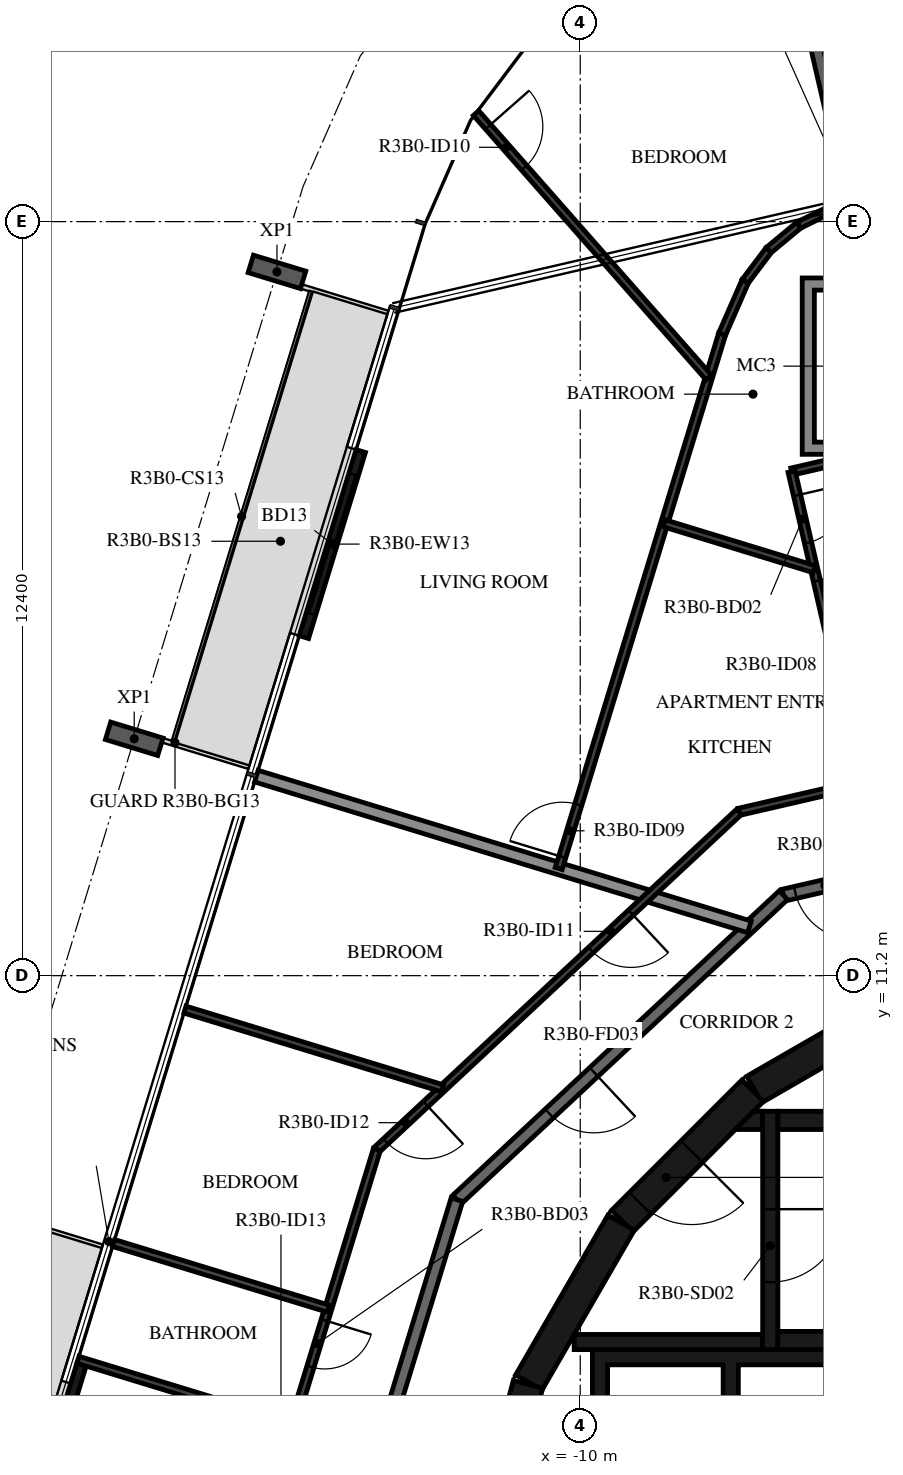
"""IFC4 building model, lengths in metres.
Left out: names, types, materials, properties, quantities, classifications, styles, units other than length and angle.
Written with IfcOpenShell. Run it as: python <this file> out.ifc"""

import sys

from ifc_helpers import new_model, si_unit, direction, frame, frame_2d, origin, origin_2d, place, context, subcontext, project, spatial, polyline, rectangle, i_section, outline, extrude, element, fill, save


model = new_model("IFC4")
c1 = context("Model", 3, precision=1e-05, world=origin(), true_north=direction((0.0, 1.0)))
c2 = subcontext(c1, "Body", "Model", "MODEL_VIEW")
j1 = project(units=[si_unit("LENGTHUNIT", "METRE"), si_unit("PLANEANGLEUNIT", "RADIAN")], contexts=[c1])
p1 = place(None, origin())
s1 = spatial("IfcSite", under=j1, at=p1, CompositionType="ELEMENT")
p2 = place(p1, origin())
s2 = spatial("IfcBuilding", under=s1, at=p2, CompositionType="ELEMENT")
p3 = place(p2, frame((0.0, 0.0, 127.4)))
s3 = spatial("IfcBuildingStorey", under=s2, at=p3, CompositionType="ELEMENT", Elevation=127.4)
for number, where, z_axis, x_axis in (
    (1, (-14.987, 22.773, -0.38), (0.0, 0.0, 1.0), (0.292, 0.956, 0.0)),
    (2, (-17.335, 15.095, -0.38), (0.0, 0.0, 1.0), (0.292, 0.956, 0.0)),
):
    element("IfcColumn", number, at=place(p3, frame(where, z_axis=z_axis, x_axis=x_axis)), inside=s3, PredefinedType="COLUMN", context=c2, shape_type="SweptSolid", body=[
        extrude(i_section(OverallWidth=0.3, OverallDepth=0.9, WebThickness=0.019, FlangeThickness=0.035, FilletRadius=0.03, at=origin_2d()), origin(), (0.0, 0.0, 1.0), 3.5),
    ])
p4 = place(p3, frame((-13.609, 19.827, 0.0), z_axis=(0.0, 0.0, 1.0), x_axis=(-0.292348395078, -0.956311882126, 0.0)))
e3 = element("IfcWall", 3, at=p4, inside=s3, PredefinedType="STANDARD", context=c2, shape_type="SweptSolid", body=[
    extrude(rectangle(XDim=3.2, YDim=0.16, at=frame_2d((1.6, 0.0))), origin(), (0.0, 0.0, 1.0), 3.12),
])
p5 = place(p4, frame((0.4, 0.0, 0.0)))
e4 = element("IfcOpeningElement", 4, at=p5, cuts=e3, PredefinedType="OPENING", context=c2, shape_type="SweptSolid", body=[
    extrude(rectangle(XDim=2.4, YDim=2.4, at=frame_2d((1.2, 1.2))), frame((0.0, 0.09, 0.0), z_axis=(0.0, -1.0, 0.0), x_axis=(1.0, 0.0, 0.0)), (0.0, 0.0, 1.0), 0.18),
])
p6 = place(p3, frame((-18.201, 4.807, 0.0), z_axis=(0.0, 0.0, 1.0), x_axis=(-0.292356467713, -0.956309414252, 0.0)))
e5 = element("IfcWall", 5, at=p6, inside=s3, PredefinedType="STANDARD", context=c2, shape_type="SweptSolid", body=[
    extrude(rectangle(XDim=3.552, YDim=0.16, at=frame_2d((1.776, 0.0))), origin(), (0.0, 0.0, 1.0), 3.12),
])
p7 = place(p6, frame((0.752, 0.0, 0.0)))
e6 = element("IfcOpeningElement", 6, at=p7, cuts=e5, PredefinedType="OPENING", context=c2, shape_type="SweptSolid", body=[
    extrude(rectangle(XDim=2.4, YDim=2.4, at=frame_2d((1.2, 1.2))), frame((0.0, 0.09, 0.0), z_axis=(0.0, -1.0, 0.0), x_axis=(1.0, 0.0, 0.0)), (0.0, 0.0, 1.0), 0.18),
])
p8 = place(p3, frame((-4.51, 10.845, 0.0), z_axis=(0.0, 0.0, 1.0), x_axis=(-0.865975092491, -0.500087131594, 0.0)))
e7 = element("IfcWall", 7, at=p8, inside=s3, PredefinedType="SHEAR", context=c2, shape_type="SweptSolid", body=[
    extrude(rectangle(XDim=3.033, YDim=0.5, at=frame_2d((1.516, 0.0))), origin(), (0.0, 0.0, 1.0), 3.12),
])
p9 = place(p3, frame((-7.164, 9.308, 0.0), z_axis=(0.0, 0.0, 1.0), x_axis=(-0.707106781187, -0.707106781187, 0.0)))
e8 = element("IfcWall", 8, at=p9, inside=s3, PredefinedType="SHEAR", context=c2, shape_type="SweptSolid", body=[
    extrude(rectangle(XDim=3.032, YDim=0.5, at=frame_2d((1.516, 0.0))), origin(), (0.0, 0.0, 1.0), 3.12),
])
p10 = place(p9, frame((1.416, 0.0, 0.0)))
e9 = element("IfcOpeningElement", 9, at=p10, cuts=e8, PredefinedType="OPENING", context=c2, shape_type="SweptSolid", body=[
    extrude(rectangle(XDim=1.2, YDim=2.1, at=frame_2d((0.6, 1.05))), frame((0.0, 0.26, 0.0), z_axis=(0.0, -1.0, 0.0), x_axis=(1.0, 0.0, 0.0)), (0.0, 0.0, 1.0), 0.52),
])
for number, where, z_axis, x_axis in (
    (10, (-9.329, 7.137, 0.0), (0.0, 0.0, 1.0), (-0.5, -0.866, 0.0)),
    (11, (-10.858, 4.479, 0.0), (0.0, 0.0, 1.0), (-0.259, -0.966, 0.0)),
):
    element("IfcWall", number, at=place(p3, frame(where, z_axis=z_axis, x_axis=x_axis)), inside=s3, PredefinedType="SHEAR", context=c2, shape_type="SweptSolid", body=[
        extrude(rectangle(XDim=3.033, YDim=0.5, at=frame_2d((1.516, 0.0))), origin(), (0.0, 0.0, 1.0), 3.12),
    ])
for number, where, z_axis, x_axis in (
    (12, (-6.75, 5.2, 0.0), (0.0, 0.0, 1.0), (1.0, 0.0, 0.0)),
    (13, (-6.75, 8.82, 0.0), (0.0, 0.0, 1.0), (1.0, 0.0, 0.0)),
):
    element("IfcWall", number, at=place(p3, frame(where, z_axis=z_axis, x_axis=x_axis)), inside=s3, PredefinedType="SHEAR", context=c2, shape_type="SweptSolid", body=[
        extrude(rectangle(XDim=6.75, YDim=0.3, at=frame_2d((3.375, 0.0))), origin(), (0.0, 0.0, 1.0), 3.12),
    ])
p11 = place(p3, frame((-6.875, 8.97, 0.0), z_axis=(0.0, 0.0, 1.0), x_axis=(0.0, -1.0, 0.0)))
e14 = element("IfcWall", 14, at=p11, inside=s3, PredefinedType="SHEAR", context=c2, shape_type="SweptSolid", body=[
    extrude(rectangle(XDim=3.92, YDim=0.25, at=frame_2d((1.96, 0.0))), origin(), (0.0, 0.0, 1.0), 3.12),
])
p12 = place(p11, frame((1.61, 0.0, 0.0)))
e15 = element("IfcOpeningElement", 15, at=p12, cuts=e14, PredefinedType="OPENING", context=c2, shape_type="SweptSolid", body=[
    extrude(rectangle(XDim=1.2, YDim=2.1, at=frame_2d((0.6, 1.05))), frame((0.0, 0.135, 0.0), z_axis=(0.0, -1.0, 0.0), x_axis=(1.0, 0.0, 0.0)), (0.0, 0.0, 1.0), 0.27),
])
p13 = place(p3, frame((-7.0, 5.175, 0.0), z_axis=(0.0, 0.0, 1.0), x_axis=(-1.0, 0.0, 0.0)))
e16 = element("IfcWall", 16, at=p13, inside=s3, PredefinedType="SHEAR", context=c2, shape_type="SweptSolid", body=[
    extrude(rectangle(XDim=3.1, YDim=0.25, at=frame_2d((1.55, 0.0))), origin(), (0.0, 0.0, 1.0), 3.12),
])
p14 = place(p3, origin())
e17 = element("IfcWall", 17, at=p14, inside=s3, PredefinedType="SHEAR", context=c2, shape_type="SweptSolid", body=[
    extrude(outline(polyline([(-7.148, 8.97), (-7.0, 8.97), (-7.0, 8.67), (-7.448, 8.67), (-7.148, 8.97)])), origin(), (0.0, 0.0, 1.0), 3.12),
])
p15 = place(p3, origin())
e18 = element("IfcWall", 18, at=p15, inside=s3, PredefinedType="SHEAR", context=c2, shape_type="SweptSolid", body=[
    extrude(outline(polyline([(-9.55, 4.8), (-7.65, 4.8), (-7.65, 1.9), (-7.4, 1.9), (-7.4, 4.8), (-5.5, 4.8), (-5.5, 1.9), (-5.25, 1.9), (-5.25, 4.8), (-3.35, 4.8), (-3.35, 1.9), (-3.1, 1.9), (-3.1, 4.8), (-1.2, 4.8), (-1.2, 1.9), (-0.95, 1.9), (-0.95, 4.8), (3.1, 4.8), (3.1, 1.9), (3.35, 1.9), (3.35, 4.8), (5.25, 4.8), (5.25, 1.9), (5.5, 1.9), (5.5, 4.8), (7.4, 4.8), (7.4, 1.9), (7.65, 1.9), (7.65, 4.8), (9.55, 4.8), (9.55, 1.9), (9.8, 1.9), (9.8, 4.8), (9.8, 5.05), (-9.8, 5.05), (-9.8, 4.8), (-9.8, 1.9), (-9.55, 1.9), (-9.55, 4.8)])), origin(), (0.0, 0.0, 1.0), 3.12),
])
p16 = place(p3, frame((0.495, 14.175, 0.0), z_axis=(0.0, 0.0, 1.0), x_axis=(-0.974376622151, -0.224922649383, 0.0)))
e19 = element("IfcWall", 19, at=p16, inside=s3, PredefinedType="STANDARD", context=c2, shape_type="SweptSolid", body=[
    extrude(rectangle(XDim=7.342, YDim=0.2, at=frame_2d((3.671, 0.0))), origin(), (0.0, 0.0, 1.0), 3.12),
])
p17 = place(p16, frame((6.142, 0.0, 0.0)))
e20 = element("IfcOpeningElement", 20, at=p17, cuts=e19, PredefinedType="OPENING", context=c2, shape_type="SweptSolid", body=[
    extrude(rectangle(XDim=1.0, YDim=2.1, at=frame_2d((0.5, 1.05))), frame((0.0, 0.11, 0.0), z_axis=(0.0, -1.0, 0.0), x_axis=(1.0, 0.0, 0.0)), (0.0, 0.0, 1.0), 0.22),
])
p18 = place(p3, frame((-6.659, 12.523, 0.0), z_axis=(0.0, 0.0, 1.0), x_axis=(-0.731350455479, -0.682001841105, 0.0)))
e21 = element("IfcWall", 21, at=p18, inside=s3, PredefinedType="STANDARD", context=c2, shape_type="SweptSolid", body=[
    extrude(rectangle(XDim=7.342, YDim=0.2, at=frame_2d((3.671, 0.0))), origin(), (0.0, 0.0, 1.0), 3.12),
])
p19 = place(p18, frame((4.264, 0.0, 0.0)))
e22 = element("IfcOpeningElement", 22, at=p19, cuts=e21, PredefinedType="OPENING", context=c2, shape_type="SweptSolid", body=[
    extrude(rectangle(XDim=1.0, YDim=2.1, at=frame_2d((0.5, 1.05))), frame((0.0, 0.11, 0.0), z_axis=(0.0, -1.0, 0.0), x_axis=(1.0, 0.0, 0.0)), (0.0, 0.0, 1.0), 0.22),
])
p20 = place(p3, frame((-12.028, 7.516, 0.0), z_axis=(0.0, 0.0, 1.0), x_axis=(-0.292365533182, -0.956306642771, 0.0)))
e23 = element("IfcWall", 23, at=p20, inside=s3, PredefinedType="STANDARD", context=c2, shape_type="SweptSolid", body=[
    extrude(rectangle(XDim=7.342, YDim=0.2, at=frame_2d((3.671, 0.0))), origin(), (0.0, 0.0, 1.0), 3.12),
])
p21 = place(p3, frame((-6.687, 28.966, 0.0), z_axis=(0.0, 0.0, 1.0), x_axis=(0.224945100086, -0.974371439415, 0.0)))
e24 = element("IfcWall", 24, at=p21, inside=s3, PredefinedType="STANDARD", context=c2, shape_type="SweptSolid", body=[
    extrude(rectangle(XDim=6.458, YDim=0.2, at=frame_2d((3.229, 0.0))), origin(), (0.0, 0.0, 1.0), 3.12),
])
p22 = place(p3, frame((-15.327, 14.481, 0.0), z_axis=(0.0, 0.0, 1.0), x_axis=(0.956303504869, -0.292375796837, 0.0)))
e25 = element("IfcWall", 25, at=p22, inside=s3, PredefinedType="STANDARD", context=c2, shape_type="SweptSolid", body=[
    extrude(rectangle(XDim=8.48, YDim=0.2, at=frame_2d((4.24, 0.0))), origin(), (0.0, 0.0, 1.0), 2.73),
])
p23 = place(p3, frame((-5.293, 19.773, 0.0), z_axis=(0.0, 0.0, 1.0), x_axis=(-0.974391195695, -0.224859506699, 0.0)))
e26 = element("IfcWall", 26, at=p23, inside=s3, PredefinedType="PARTITIONING", context=c2, shape_type="SweptSolid", body=[
    extrude(rectangle(XDim=1.264, YDim=0.12, at=frame_2d((0.632, 0.0))), origin(), (0.0, 0.0, 1.0), 3.12),
])
p24 = place(p3, frame((-6.524, 19.489, 0.0), z_axis=(0.0, 0.0, 1.0), x_axis=(0.22494768659, -0.974370842286, 0.0)))
e27 = element("IfcWall", 27, at=p24, inside=s3, PredefinedType="PARTITIONING", context=c2, shape_type="SweptSolid", body=[
    extrude(rectangle(XDim=5.257, YDim=0.12, at=frame_2d((2.629, 0.0))), origin(), (0.0, 0.0, 1.0), 3.12),
])
p25 = place(p24, frame((0.4, 0.0, 0.0)))
e28 = element("IfcOpeningElement", 28, at=p25, cuts=e27, PredefinedType="OPENING", context=c2, shape_type="SweptSolid", body=[
    extrude(rectangle(XDim=0.8, YDim=2.1, at=frame_2d((0.4, 1.05))), frame((0.0, 0.07, 0.0), z_axis=(0.0, -1.0, 0.0), x_axis=(1.0, 0.0, 0.0)), (0.0, 0.0, 1.0), 0.14),
])
p26 = place(p24, frame((1.846, 0.0, 0.0)))
e29 = element("IfcOpeningElement", 29, at=p26, cuts=e27, PredefinedType="OPENING", context=c2, shape_type="SweptSolid", body=[
    extrude(rectangle(XDim=0.9, YDim=2.1, at=frame_2d((0.45, 1.05))), frame((0.0, 0.07, 0.0), z_axis=(0.0, -1.0, 0.0), x_axis=(1.0, 0.0, 0.0)), (0.0, 0.0, 1.0), 0.14),
])
p27 = place(p3, frame((-5.342, 14.367, 0.0), z_axis=(0.0, 0.0, 1.0), x_axis=(-0.974367677287, -0.224961395484, 0.0)))
e30 = element("IfcWall", 30, at=p27, inside=s3, PredefinedType="PARTITIONING", context=c2, shape_type="SweptSolid", body=[
    extrude(rectangle(XDim=2.1, YDim=0.12, at=frame_2d((1.05, 0.0))), origin(), (0.0, 0.0, 1.0), 3.12),
])
p28 = place(p3, frame((-7.388, 13.894, 0.0), z_axis=(0.0, 0.0, 1.0), x_axis=(-0.731357186721, -0.681994622729, 0.0)))
e31 = element("IfcWall", 31, at=p28, inside=s3, PredefinedType="PARTITIONING", context=c2, shape_type="SweptSolid", body=[
    extrude(rectangle(XDim=8.146, YDim=0.12, at=frame_2d((4.073, 0.0))), origin(), (0.0, 0.0, 1.0), 3.12),
])
p29 = place(p28, frame((2.432, 0.0, 0.0)))
e32 = element("IfcOpeningElement", 32, at=p29, cuts=e31, PredefinedType="OPENING", context=c2, shape_type="SweptSolid", body=[
    extrude(rectangle(XDim=0.9, YDim=2.1, at=frame_2d((0.45, 1.05))), frame((0.0, 0.07, 0.0), z_axis=(0.0, -1.0, 0.0), x_axis=(1.0, 0.0, 0.0)), (0.0, 0.0, 1.0), 0.14),
])
p30 = place(p28, frame((7.046, 0.0, 0.0)))
e33 = element("IfcOpeningElement", 33, at=p30, cuts=e31, PredefinedType="OPENING", context=c2, shape_type="SweptSolid", body=[
    extrude(rectangle(XDim=0.9, YDim=2.1, at=frame_2d((0.45, 1.05))), frame((0.0, 0.07, 0.0), z_axis=(0.0, -1.0, 0.0), x_axis=(1.0, 0.0, 0.0)), (0.0, 0.0, 1.0), 0.14),
])
p31 = place(p3, frame((-10.354, 12.961, 0.0), z_axis=(0.0, 0.0, 1.0), x_axis=(0.292379778045, 0.956302287663, 0.0)))
e34 = element("IfcWall", 34, at=p31, inside=s3, PredefinedType="PARTITIONING", context=c2, shape_type="SweptSolid", body=[
    extrude(rectangle(XDim=9.194, YDim=0.12, at=frame_2d((4.597, 0.0))), origin(), (0.0, 0.0, 1.0), 3.12),
])
p32 = place(p31, frame((0.2, 0.0, 0.0)))
e35 = element("IfcOpeningElement", 35, at=p32, cuts=e34, PredefinedType="OPENING", context=c2, shape_type="SweptSolid", body=[
    extrude(rectangle(XDim=0.9, YDim=2.1, at=frame_2d((0.45, 1.05))), frame((0.0, 0.07, 0.0), z_axis=(0.0, -1.0, 0.0), x_axis=(1.0, 0.0, 0.0)), (0.0, 0.0, 1.0), 0.14),
])
p33 = place(p3, frame((-7.666, 21.753, 0.0), z_axis=(0.0, 0.0, 1.0), x_axis=(0.401562829944, 0.915831476642, 0.0)))
e36 = element("IfcWall", 36, at=p33, inside=s3, PredefinedType="PARTITIONING", context=c2, shape_type="SweptSolid", body=[
    extrude(rectangle(XDim=0.947, YDim=0.12, at=frame_2d((0.473, 0.0))), origin(), (0.0, 0.0, 1.0), 3.12),
])
p34 = place(p3, frame((-7.286, 22.62, 0.0), z_axis=(0.0, 0.0, 1.0), x_axis=(0.601702575527, 0.798720233, 0.0)))
e37 = element("IfcWall", 37, at=p34, inside=s3, PredefinedType="PARTITIONING", context=c2, shape_type="SweptSolid", body=[
    extrude(rectangle(XDim=0.642, YDim=0.12, at=frame_2d((0.321, 0.0))), origin(), (0.0, 0.0, 1.0), 3.12),
])
p35 = place(p3, frame((-6.9, 23.132, 0.0), z_axis=(0.0, 0.0, 1.0), x_axis=(0.769653132962, 0.638462258025, 0.0)))
e38 = element("IfcWall", 38, at=p35, inside=s3, PredefinedType="PARTITIONING", context=c2, shape_type="SweptSolid", body=[
    extrude(rectangle(XDim=0.642, YDim=0.12, at=frame_2d((0.321, 0.0))), origin(), (0.0, 0.0, 1.0), 3.12),
])
p36 = place(p3, frame((-6.406, 23.542, 0.0), z_axis=(0.0, 0.0, 1.0), x_axis=(0.896245703043, 0.44355793283, 0.0)))
e39 = element("IfcWall", 39, at=p36, inside=s3, PredefinedType="PARTITIONING", context=c2, shape_type="SweptSolid", body=[
    extrude(rectangle(XDim=0.642, YDim=0.12, at=frame_2d((0.321, 0.0))), origin(), (0.0, 0.0, 1.0), 3.12),
])
p37 = place(p3, frame((-11.713, 25.385, 0.0), z_axis=(0.0, 0.0, 1.0), x_axis=(0.660694383024, -0.750655002142, 0.0)))
e40 = element("IfcWall", 40, at=p37, inside=s3, PredefinedType="PARTITIONING", context=c2, shape_type="SweptSolid", body=[
    extrude(rectangle(XDim=5.794, YDim=0.12, at=frame_2d((2.897, 0.0))), origin(), (0.0, 0.0, 1.0), 3.12),
])
p38 = place(p37, frame((0.3, 0.0, 0.0)))
e41 = element("IfcOpeningElement", 41, at=p38, cuts=e40, PredefinedType="OPENING", context=c2, shape_type="SweptSolid", body=[
    extrude(rectangle(XDim=0.9, YDim=2.1, at=frame_2d((0.45, 1.05))), frame((0.0, 0.07, 0.0), z_axis=(0.0, -1.0, 0.0), x_axis=(1.0, 0.0, 0.0)), (0.0, 0.0, 1.0), 0.14),
])
p39 = place(p3, frame((-8.618, 18.639, 0.0), z_axis=(0.0, 0.0, 1.0), x_axis=(0.956305961168, -0.292367762647, 0.0)))
e42 = element("IfcWall", 42, at=p39, inside=s3, PredefinedType="PARTITIONING", context=c2, shape_type="SweptSolid", body=[
    extrude(rectangle(XDim=2.577, YDim=0.12, at=frame_2d((1.289, 0.0))), origin(), (0.0, 0.0, 1.0), 3.12),
])
p40 = place(p3, frame((-13.345, 8.339, 0.0), z_axis=(0.0, 0.0, 1.0), x_axis=(-0.292341490839, -0.956313992752, 0.0)))
e43 = element("IfcWall", 43, at=p40, inside=s3, PredefinedType="PARTITIONING", context=c2, shape_type="SweptSolid", body=[
    extrude(rectangle(XDim=4.742, YDim=0.12, at=frame_2d((2.371, 0.0))), origin(), (0.0, 0.0, 1.0), 3.12),
])
p41 = place(p40, frame((2.935, 0.0, 0.0)))
e44 = element("IfcOpeningElement", 44, at=p41, cuts=e43, PredefinedType="OPENING", context=c2, shape_type="SweptSolid", body=[
    extrude(rectangle(XDim=0.8, YDim=2.1, at=frame_2d((0.4, 1.05))), frame((0.0, 0.07, 0.0), z_axis=(0.0, -1.0, 0.0), x_axis=(1.0, 0.0, 0.0)), (0.0, 0.0, 1.0), 0.14),
])
p42 = place(p3, frame((-16.5, 10.642, 0.0), z_axis=(0.0, 0.0, 1.0), x_axis=(0.9563053536, -0.292369749934, 0.0)))
e45 = element("IfcWall", 45, at=p42, inside=s3, PredefinedType="PARTITIONING", context=c2, shape_type="SweptSolid", body=[
    extrude(rectangle(XDim=4.43, YDim=0.12, at=frame_2d((2.215, 0.0))), origin(), (0.0, 0.0, 1.0), 3.12),
])
p43 = place(p3, frame((-17.674, 6.803, 0.0), z_axis=(0.0, 0.0, 1.0), x_axis=(0.956309456779, -0.292356328604, 0.0)))
e46 = element("IfcWall", 46, at=p43, inside=s3, PredefinedType="PARTITIONING", context=c2, shape_type="SweptSolid", body=[
    extrude(rectangle(XDim=3.691, YDim=0.12, at=frame_2d((1.846, 0.0))), origin(), (0.0, 0.0, 1.0), 2.73),
])
p44 = place(p3, frame((-14.731, 3.804, 0.0), z_axis=(0.0, 0.0, 1.0), x_axis=(-0.956303802771, 0.292374822456, 0.0)))
e47 = element("IfcWall", 47, at=p44, inside=s3, PredefinedType="PARTITIONING", context=c2, shape_type="SweptSolid", body=[
    extrude(rectangle(XDim=3.691, YDim=0.12, at=frame_2d((1.845, 0.0))), origin(), (0.0, 0.0, 1.0), 3.12),
])
p45 = place(p3, origin())
e48 = element("IfcWall", 48, at=p45, inside=s3, PredefinedType="STANDARD", context=c2, shape_type="SweptSolid", body=[
    extrude(outline(polyline([(-3.45, 22.674), (-3.45, 19.773), (-6.35, 19.773), (-6.35, 22.674), (-3.45, 22.674)]), holes=[polyline([(-6.15, 19.973), (-3.65, 19.973), (-3.65, 22.473), (-6.15, 22.473), (-6.15, 19.973)])]), origin(), (0.0, 0.0, 1.0), 3.12),
])
p46 = place(p5, origin())
e49 = element("IfcDoor", 49, at=p46, inside=s3, OperationType="DOUBLE_DOOR_SLIDING", PredefinedType="DOOR", context=c2, shape_type="SweptSolid", body=[
    extrude(rectangle(XDim=2.4, YDim=2.4, at=frame_2d((1.2, 1.2))), frame((0.0, 0.025, 0.0), z_axis=(0.0, -1.0, 0.0), x_axis=(1.0, 0.0, 0.0)), (0.0, 0.0, 1.0), 0.05),
])
fill(e4, e49)
p47 = place(p12, origin())
e50 = element("IfcDoor", 50, at=p47, inside=s3, OperationType="SINGLE_SWING_LEFT", PredefinedType="DOOR", context=c2, shape_type="SweptSolid", body=[
    extrude(rectangle(XDim=1.2, YDim=2.1, at=frame_2d((0.6, 1.05))), frame((0.0, 0.025, 0.0), z_axis=(0.0, -1.0, 0.0), x_axis=(1.0, 0.0, 0.0)), (0.0, 0.0, 1.0), 0.05),
])
fill(e15, e50)
p48 = place(p10, origin())
e51 = element("IfcDoor", 51, at=p48, inside=s3, OperationType="SINGLE_SWING_RIGHT", PredefinedType="DOOR", context=c2, shape_type="SweptSolid", body=[
    extrude(rectangle(XDim=1.2, YDim=2.1, at=frame_2d((0.6, 1.05))), frame((0.0, 0.025, 0.0), z_axis=(0.0, -1.0, 0.0), x_axis=(1.0, 0.0, 0.0)), (0.0, 0.0, 1.0), 0.05),
])
fill(e9, e51)
p49 = place(p17, origin())
e52 = element("IfcDoor", 52, at=p49, inside=s3, OperationType="SINGLE_SWING_LEFT", PredefinedType="DOOR", context=c2, shape_type="SweptSolid", body=[
    extrude(rectangle(XDim=1.0, YDim=2.1, at=frame_2d((0.5, 1.05))), frame((0.0, 0.025, 0.0), z_axis=(0.0, -1.0, 0.0), x_axis=(1.0, 0.0, 0.0)), (0.0, 0.0, 1.0), 0.05),
])
fill(e20, e52)
p50 = place(p25, origin())
e53 = element("IfcDoor", 53, at=p50, inside=s3, OperationType="SINGLE_SWING_LEFT", PredefinedType="DOOR", context=c2, shape_type="SweptSolid", body=[
    extrude(rectangle(XDim=0.8, YDim=2.1, at=frame_2d((0.4, 1.05))), frame((0.0, 0.025, 0.0), z_axis=(0.0, -1.0, 0.0), x_axis=(1.0, 0.0, 0.0)), (0.0, 0.0, 1.0), 0.05),
])
fill(e28, e53)
p51 = place(p26, origin())
e54 = element("IfcDoor", 54, at=p51, inside=s3, OperationType="SINGLE_SWING_LEFT", PredefinedType="DOOR", context=c2, shape_type="SweptSolid", body=[
    extrude(rectangle(XDim=0.9, YDim=2.1, at=frame_2d((0.45, 1.05))), frame((0.0, 0.025, 0.0), z_axis=(0.0, -1.0, 0.0), x_axis=(1.0, 0.0, 0.0)), (0.0, 0.0, 1.0), 0.05),
])
fill(e29, e54)
p52 = place(p32, origin())
e55 = element("IfcDoor", 55, at=p52, inside=s3, OperationType="SINGLE_SWING_LEFT", PredefinedType="DOOR", context=c2, shape_type="SweptSolid", body=[
    extrude(rectangle(XDim=0.9, YDim=2.1, at=frame_2d((0.45, 1.05))), frame((0.0, 0.025, 0.0), z_axis=(0.0, -1.0, 0.0), x_axis=(1.0, 0.0, 0.0)), (0.0, 0.0, 1.0), 0.05),
])
fill(e35, e55)
p53 = place(p38, origin())
e56 = element("IfcDoor", 56, at=p53, inside=s3, OperationType="SINGLE_SWING_LEFT", PredefinedType="DOOR", context=c2, shape_type="SweptSolid", body=[
    extrude(rectangle(XDim=0.9, YDim=2.1, at=frame_2d((0.45, 1.05))), frame((0.0, 0.025, 0.0), z_axis=(0.0, -1.0, 0.0), x_axis=(1.0, 0.0, 0.0)), (0.0, 0.0, 1.0), 0.05),
])
fill(e41, e56)
p54 = place(p19, origin())
e57 = element("IfcDoor", 57, at=p54, inside=s3, OperationType="SINGLE_SWING_LEFT", PredefinedType="DOOR", context=c2, shape_type="SweptSolid", body=[
    extrude(rectangle(XDim=1.0, YDim=2.1, at=frame_2d((0.5, 1.05))), frame((0.0, 0.025, 0.0), z_axis=(0.0, -1.0, 0.0), x_axis=(1.0, 0.0, 0.0)), (0.0, 0.0, 1.0), 0.05),
])
fill(e22, e57)
p55 = place(p29, origin())
e58 = element("IfcDoor", 58, at=p55, inside=s3, OperationType="SINGLE_SWING_LEFT", PredefinedType="DOOR", context=c2, shape_type="SweptSolid", body=[
    extrude(rectangle(XDim=0.9, YDim=2.1, at=frame_2d((0.45, 1.05))), frame((0.0, 0.025, 0.0), z_axis=(0.0, -1.0, 0.0), x_axis=(1.0, 0.0, 0.0)), (0.0, 0.0, 1.0), 0.05),
])
fill(e32, e58)
p56 = place(p30, origin())
e59 = element("IfcDoor", 59, at=p56, inside=s3, OperationType="SINGLE_SWING_LEFT", PredefinedType="DOOR", context=c2, shape_type="SweptSolid", body=[
    extrude(rectangle(XDim=0.9, YDim=2.1, at=frame_2d((0.45, 1.05))), frame((0.0, 0.025, 0.0), z_axis=(0.0, -1.0, 0.0), x_axis=(1.0, 0.0, 0.0)), (0.0, 0.0, 1.0), 0.05),
])
fill(e33, e59)
p57 = place(p41, origin())
e60 = element("IfcDoor", 60, at=p57, inside=s3, OperationType="SINGLE_SWING_LEFT", PredefinedType="DOOR", context=c2, shape_type="SweptSolid", body=[
    extrude(rectangle(XDim=0.8, YDim=2.1, at=frame_2d((0.4, 1.05))), frame((0.0, 0.025, 0.0), z_axis=(0.0, -1.0, 0.0), x_axis=(1.0, 0.0, 0.0)), (0.0, 0.0, 1.0), 0.05),
])
fill(e44, e60)
save(model, sys.argv[1])
